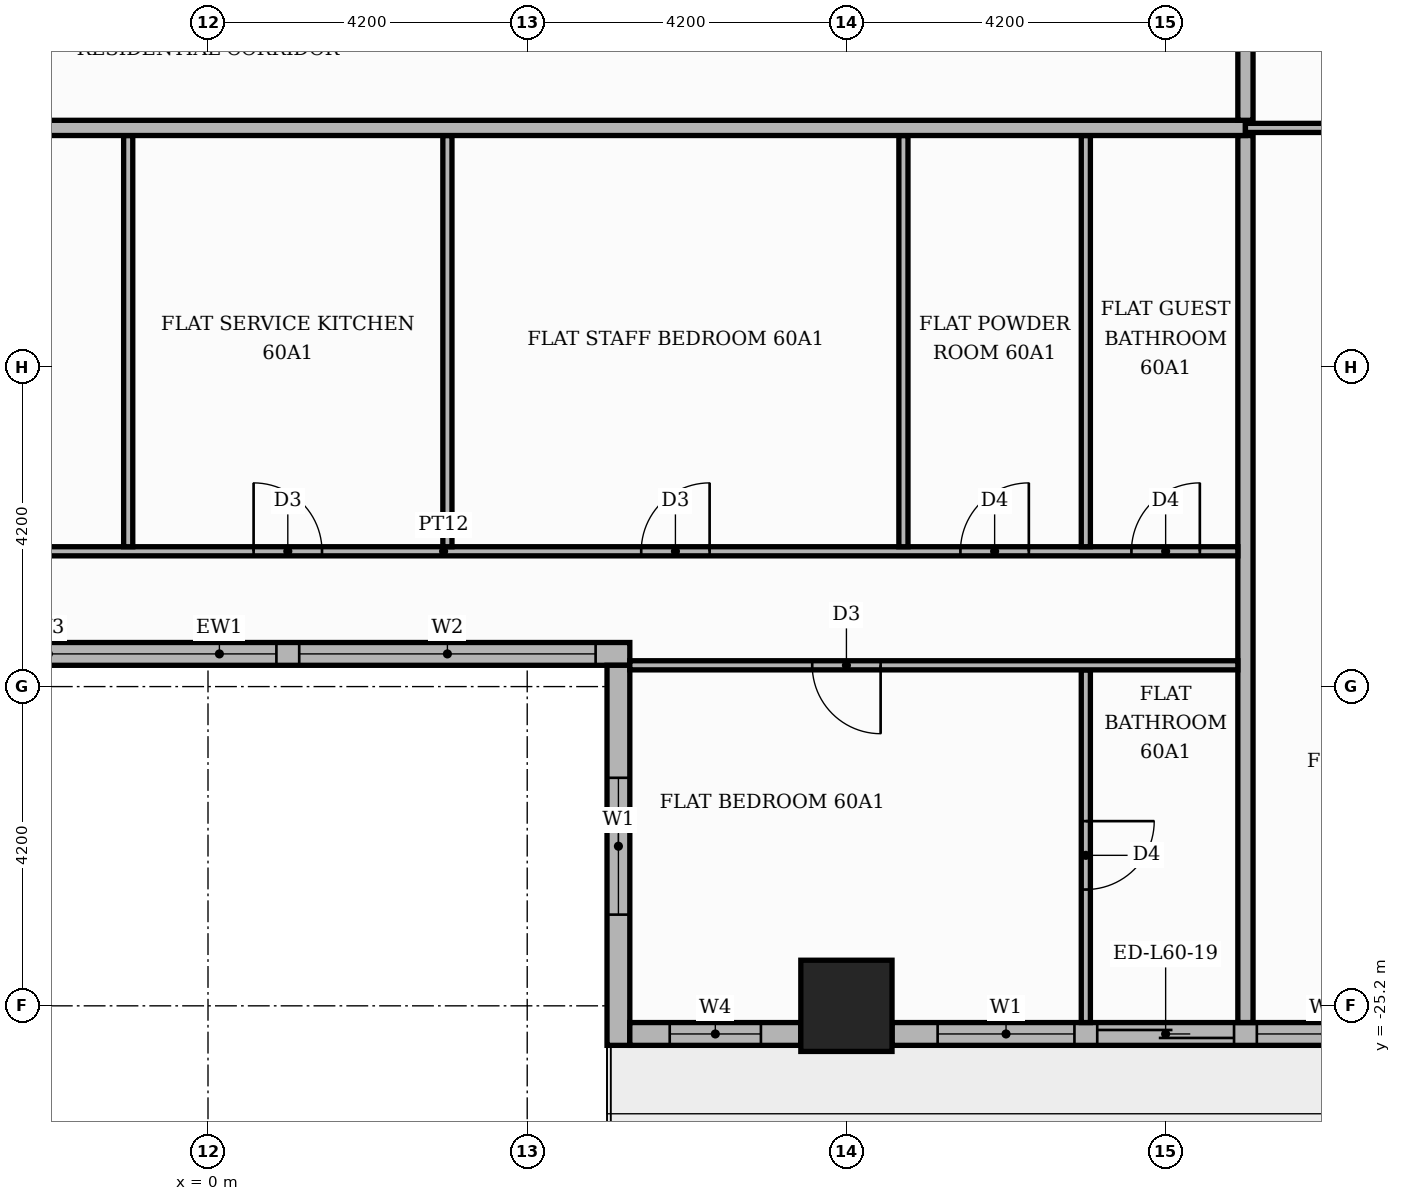
"""IFC4 building model, lengths in metres.
Left out: names, types, materials, properties, quantities, classifications, styles, units other than length and angle.
Written with IfcOpenShell. Run it as: python <this file> out.ifc"""

import sys

from ifc_helpers import new_model, si_unit, direction, frame, frame_2d, origin, origin_2d, place, context, subcontext, project, spatial, rectangle, extrude, element, fill, save


model = new_model("IFC4")
c1 = context("Model", 3, precision=1e-05, world=origin(), true_north=direction((0.0, 1.0)))
c2 = subcontext(c1, "Body", "Model", "MODEL_VIEW")
j1 = project(units=[si_unit("LENGTHUNIT", "METRE"), si_unit("PLANEANGLEUNIT", "RADIAN")], contexts=[c1])
p1 = place(None, origin())
s1 = spatial("IfcSite", under=j1, at=p1, CompositionType="ELEMENT")
p2 = place(p1, origin())
s2 = spatial("IfcBuilding", under=s1, at=p2, CompositionType="ELEMENT")
p3 = place(p2, frame((0.0, 0.0, 252.3)))
s3 = spatial("IfcBuildingStorey", under=s2, at=p3, CompositionType="ELEMENT", Elevation=252.3)
p4 = place(p3, frame((8.4, -25.2, 0.0), z_axis=(0.0, 0.0, 1.0), x_axis=(1.0, 0.0, 0.0)))
e1 = element("IfcColumn", 1, at=p4, inside=s3, PredefinedType="COLUMN", context=c2, shape_type="SweptSolid", body=[
    extrude(rectangle(XDim=1.2, YDim=1.2, at=origin_2d()), origin(), (0.0, 0.0, 1.0), 3.9),
])
p5 = place(p3, frame((-5.25, -20.57, 0.0), z_axis=(0.0, 0.0, 1.0), x_axis=(1.0, 0.0, 0.0)))
e2 = element("IfcWall", 2, at=p5, inside=s3, PredefinedType="STANDARD", context=c2, shape_type="SweptSolid", body=[
    extrude(rectangle(XDim=10.8, YDim=0.3, at=frame_2d((5.4, 0.0))), origin(), (0.0, 0.0, 1.0), 3.48),
])
p6 = place(p5, frame((0.15, 0.0, 0.9)))
e3 = element("IfcOpeningElement", 3, at=p6, cuts=e2, PredefinedType="OPENING", context=c2, shape_type="SweptSolid", body=[
    extrude(rectangle(XDim=6.0, YDim=2.1, at=frame_2d((3.0, 1.05))), frame((0.0, 0.16, 0.0), z_axis=(0.0, -1.0, 0.0), x_axis=(1.0, 0.0, 0.0)), (0.0, 0.0, 1.0), 0.32),
])
p7 = place(p5, frame((6.45, 0.0, 0.9)))
e4 = element("IfcOpeningElement", 4, at=p7, cuts=e2, PredefinedType="OPENING", context=c2, shape_type="SweptSolid", body=[
    extrude(rectangle(XDim=3.9, YDim=2.1, at=frame_2d((1.95, 1.05))), frame((0.0, 0.16, 0.0), z_axis=(0.0, -1.0, 0.0), x_axis=(1.0, 0.0, 0.0)), (0.0, 0.0, 1.0), 0.32),
])
p8 = place(p3, frame((5.4, -20.72, 0.0), z_axis=(0.0, 0.0, 1.0), x_axis=(0.0, -1.0, 0.0)))
e5 = element("IfcWall", 5, at=p8, inside=s3, PredefinedType="STANDARD", context=c2, shape_type="SweptSolid", body=[
    extrude(rectangle(XDim=5.0, YDim=0.3, at=frame_2d((2.5, 0.0))), origin(), (0.0, 0.0, 1.0), 3.48),
])
p9 = place(p8, frame((1.48, 0.0, 0.9)))
e6 = element("IfcOpeningElement", 6, at=p9, cuts=e5, PredefinedType="OPENING", context=c2, shape_type="SweptSolid", body=[
    extrude(rectangle(XDim=1.8, YDim=2.1, at=frame_2d((0.9, 1.05))), frame((0.0, 0.16, 0.0), z_axis=(0.0, -1.0, 0.0), x_axis=(1.0, 0.0, 0.0)), (0.0, 0.0, 1.0), 0.32),
])
p10 = place(p3, frame((5.55, -25.57, 0.0), z_axis=(0.0, 0.0, 1.0), x_axis=(1.0, 0.0, 0.0)))
e7 = element("IfcWall", 7, at=p10, inside=s3, PredefinedType="STANDARD", context=c2, shape_type="SweptSolid", body=[
    extrude(rectangle(XDim=2.25, YDim=0.3, at=frame_2d((1.125, 0.0))), origin(), (0.0, 0.0, 1.0), 3.48),
])
p11 = place(p10, frame((0.525, 0.0, 0.9)))
e8 = element("IfcOpeningElement", 8, at=p11, cuts=e7, PredefinedType="OPENING", context=c2, shape_type="SweptSolid", body=[
    extrude(rectangle(XDim=1.2, YDim=2.1, at=frame_2d((0.6, 1.05))), frame((0.0, 0.16, 0.0), z_axis=(0.0, -1.0, 0.0), x_axis=(1.0, 0.0, 0.0)), (0.0, 0.0, 1.0), 0.32),
])
p12 = place(p3, frame((9.0, -25.57, 0.0), z_axis=(0.0, 0.0, 1.0), x_axis=(1.0, 0.0, 0.0)))
e9 = element("IfcWall", 9, at=p12, inside=s3, PredefinedType="STANDARD", context=c2, shape_type="SweptSolid", body=[
    extrude(rectangle(XDim=7.2, YDim=0.3, at=frame_2d((3.6, 0.0))), origin(), (0.0, 0.0, 1.0), 3.48),
])
p13 = place(p12, frame((0.6, 0.0, 0.9)))
e10 = element("IfcOpeningElement", 10, at=p13, cuts=e9, PredefinedType="OPENING", context=c2, shape_type="SweptSolid", body=[
    extrude(rectangle(XDim=1.8, YDim=2.1, at=frame_2d((0.9, 1.05))), frame((0.0, 0.16, 0.0), z_axis=(0.0, -1.0, 0.0), x_axis=(1.0, 0.0, 0.0)), (0.0, 0.0, 1.0), 0.32),
])
p14 = place(p12, frame((2.7, 0.0, 0.0)))
e11 = element("IfcOpeningElement", 11, at=p14, cuts=e9, PredefinedType="OPENING", context=c2, shape_type="SweptSolid", body=[
    extrude(rectangle(XDim=1.8, YDim=2.4, at=frame_2d((0.9, 1.2))), frame((0.0, 0.16, 0.0), z_axis=(0.0, -1.0, 0.0), x_axis=(1.0, 0.0, 0.0)), (0.0, 0.0, 1.0), 0.32),
])
p15 = place(p12, frame((4.8, 0.0, 0.9)))
e12 = element("IfcOpeningElement", 12, at=p15, cuts=e9, PredefinedType="OPENING", context=c2, shape_type="SweptSolid", body=[
    extrude(rectangle(XDim=1.8, YDim=2.1, at=frame_2d((0.9, 1.05))), frame((0.0, 0.16, 0.0), z_axis=(0.0, -1.0, 0.0), x_axis=(1.0, 0.0, 0.0)), (0.0, 0.0, 1.0), 0.32),
])
p16 = place(p3, frame((11.55, -25.42, 0.0), z_axis=(0.0, 0.0, 1.0), x_axis=(0.0, 1.0, 0.0)))
e13 = element("IfcWall", 13, at=p16, inside=s3, PredefinedType="PARTITIONING", context=c2, shape_type="SweptSolid", body=[
    extrude(rectangle(XDim=4.64, YDim=0.12, at=frame_2d((2.32, 0.0))), origin(), (0.0, 0.0, 1.0), 3.48),
])
p17 = place(p16, frame((1.75, 0.0, 0.0)))
e14 = element("IfcOpeningElement", 14, at=p17, cuts=e13, PredefinedType="OPENING", context=c2, shape_type="SweptSolid", body=[
    extrude(rectangle(XDim=0.9, YDim=2.1, at=frame_2d((0.45, 1.05))), frame((0.0, 0.07, 0.0), z_axis=(0.0, -1.0, 0.0), x_axis=(1.0, 0.0, 0.0)), (0.0, 0.0, 1.0), 0.14),
])
p18 = place(p3, frame((13.65, -25.42, 0.0), z_axis=(0.0, 0.0, 1.0), x_axis=(0.0, 1.0, 0.0)))
e15 = element("IfcWall", 15, at=p18, inside=s3, PredefinedType="PARTITIONING", context=c2, shape_type="SweptSolid", body=[
    extrude(rectangle(XDim=11.67, YDim=0.2, at=frame_2d((5.835, 0.0))), origin(), (0.0, 0.0, 1.0), 3.48),
])
p19 = place(p3, frame((5.55, -20.72, 0.0), z_axis=(0.0, 0.0, 1.0), x_axis=(1.0, 0.0, 0.0)))
e16 = element("IfcWall", 16, at=p19, inside=s3, PredefinedType="PARTITIONING", context=c2, shape_type="SweptSolid", body=[
    extrude(rectangle(XDim=8.0, YDim=0.12, at=frame_2d((4.0, 0.0))), origin(), (0.0, 0.0, 1.0), 3.48),
])
p20 = place(p19, frame((2.4, 0.0, 0.0)))
e17 = element("IfcOpeningElement", 17, at=p20, cuts=e16, PredefinedType="OPENING", context=c2, shape_type="SweptSolid", body=[
    extrude(rectangle(XDim=0.9, YDim=2.1, at=frame_2d((0.45, 1.05))), frame((0.0, 0.07, 0.0), z_axis=(0.0, -1.0, 0.0), x_axis=(1.0, 0.0, 0.0)), (0.0, 0.0, 1.0), 0.14),
])
p21 = place(p3, frame((-7.35, -19.22, 0.0), z_axis=(0.0, 0.0, 1.0), x_axis=(1.0, 0.0, 0.0)))
e18 = element("IfcWall", 18, at=p21, inside=s3, PredefinedType="PARTITIONING", context=c2, shape_type="SweptSolid", body=[
    extrude(rectangle(XDim=20.9, YDim=0.12, at=frame_2d((10.45, 0.0))), origin(), (0.0, 0.0, 1.0), 3.48),
])
p22 = place(p21, frame((2.7, 0.0, 0.0)))
e19 = element("IfcOpeningElement", 19, at=p22, cuts=e18, PredefinedType="OPENING", context=c2, shape_type="SweptSolid", body=[
    extrude(rectangle(XDim=0.9, YDim=2.1, at=frame_2d((0.45, 1.05))), frame((0.0, 0.07, 0.0), z_axis=(0.0, -1.0, 0.0), x_axis=(1.0, 0.0, 0.0)), (0.0, 0.0, 1.0), 0.14),
])
p23 = place(p21, frame((7.95, 0.0, 0.0)))
e20 = element("IfcOpeningElement", 20, at=p23, cuts=e18, PredefinedType="OPENING", context=c2, shape_type="SweptSolid", body=[
    extrude(rectangle(XDim=0.9, YDim=2.1, at=frame_2d((0.45, 1.05))), frame((0.0, 0.07, 0.0), z_axis=(0.0, -1.0, 0.0), x_axis=(1.0, 0.0, 0.0)), (0.0, 0.0, 1.0), 0.14),
])
p24 = place(p21, frame((13.05, 0.0, 0.0)))
e21 = element("IfcOpeningElement", 21, at=p24, cuts=e18, PredefinedType="OPENING", context=c2, shape_type="SweptSolid", body=[
    extrude(rectangle(XDim=0.9, YDim=2.1, at=frame_2d((0.45, 1.05))), frame((0.0, 0.07, 0.0), z_axis=(0.0, -1.0, 0.0), x_axis=(1.0, 0.0, 0.0)), (0.0, 0.0, 1.0), 0.14),
])
p25 = place(p21, frame((17.25, 0.0, 0.0)))
e22 = element("IfcOpeningElement", 22, at=p25, cuts=e18, PredefinedType="OPENING", context=c2, shape_type="SweptSolid", body=[
    extrude(rectangle(XDim=0.9, YDim=2.1, at=frame_2d((0.45, 1.05))), frame((0.0, 0.07, 0.0), z_axis=(0.0, -1.0, 0.0), x_axis=(1.0, 0.0, 0.0)), (0.0, 0.0, 1.0), 0.14),
])
p26 = place(p21, frame((19.5, 0.0, 0.0)))
e23 = element("IfcOpeningElement", 23, at=p26, cuts=e18, PredefinedType="OPENING", context=c2, shape_type="SweptSolid", body=[
    extrude(rectangle(XDim=0.9, YDim=2.1, at=frame_2d((0.45, 1.05))), frame((0.0, 0.07, 0.0), z_axis=(0.0, -1.0, 0.0), x_axis=(1.0, 0.0, 0.0)), (0.0, 0.0, 1.0), 0.14),
])
for number, where, z_axis, x_axis in (
    (24, (-1.05, -19.16, 0.0), (0.0, 0.0, 1.0), (0.0, 1.0, 0.0)),
    (25, (3.15, -19.16, 0.0), (0.0, 0.0, 1.0), (0.0, 1.0, 0.0)),
    (26, (9.15, -19.16, 0.0), (0.0, 0.0, 1.0), (0.0, 1.0, 0.0)),
    (27, (11.55, -19.16, 0.0), (0.0, 0.0, 1.0), (0.0, 1.0, 0.0)),
):
    element("IfcWall", number, at=place(p3, frame(where, z_axis=z_axis, x_axis=x_axis)), inside=s3, PredefinedType="PARTITIONING", context=c2, shape_type="SweptSolid", body=[
        extrude(rectangle(XDim=5.41, YDim=0.12, at=frame_2d((2.705, 0.0))), origin(), (0.0, 0.0, 1.0), 3.48),
    ])
p27 = place(p3, frame((-25.42, -13.65, 0.0), z_axis=(0.0, 0.0, 1.0), x_axis=(1.0, 0.0, 0.0)))
e28 = element("IfcWall", 28, at=p27, inside=s3, PredefinedType="PARTITIONING", context=c2, shape_type="SweptSolid", body=[
    extrude(rectangle(XDim=39.07, YDim=0.2, at=frame_2d((19.535, 0.0))), origin(), (0.0, 0.0, 1.0), 3.48),
])
p28 = place(p27, frame((14.37, 0.0, 0.0)))
e29 = element("IfcOpeningElement", 29, at=p28, cuts=e28, PredefinedType="OPENING", context=c2, shape_type="SweptSolid", body=[
    extrude(rectangle(XDim=1.1, YDim=2.4, at=frame_2d((0.55, 1.2))), frame((0.0, 0.11, 0.0), z_axis=(0.0, -1.0, 0.0), x_axis=(1.0, 0.0, 0.0)), (0.0, 0.0, 1.0), 0.22),
])
p29 = place(p3, frame((13.65, -13.65, 0.0), z_axis=(0.0, 0.0, 1.0), x_axis=(1.0, 0.0, 0.0)))
e30 = element("IfcWall", 30, at=p29, inside=s3, PredefinedType="PARTITIONING", context=c2, shape_type="SweptSolid", body=[
    extrude(rectangle(XDim=6.17, YDim=0.12, at=frame_2d((3.085, 0.0))), origin(), (0.0, 0.0, 1.0), 3.48),
])
p30 = place(p29, frame((2.635, 0.0, 0.0)))
e31 = element("IfcOpeningElement", 31, at=p30, cuts=e30, PredefinedType="OPENING", context=c2, shape_type="SweptSolid", body=[
    extrude(rectangle(XDim=0.9, YDim=2.1, at=frame_2d((0.45, 1.05))), frame((0.0, 0.07, 0.0), z_axis=(0.0, -1.0, 0.0), x_axis=(1.0, 0.0, 0.0)), (0.0, 0.0, 1.0), 0.14),
])
p31 = place(p3, frame((13.65, -13.55, 0.0), z_axis=(0.0, 0.0, 1.0), x_axis=(0.0, 1.0, 0.0)))
e32 = element("IfcWall", 32, at=p31, inside=s3, PredefinedType="PARTITIONING", context=c2, shape_type="SweptSolid", body=[
    extrude(rectangle(XDim=2.45, YDim=0.2, at=frame_2d((1.225, 0.0))), origin(), (0.0, 0.0, 1.0), 3.48),
])
p32 = place(p6, origin())
e33 = element("IfcWindow", 33, at=p32, inside=s3, PartitioningType="SINGLE_PANEL", PredefinedType="WINDOW", context=c2, shape_type="SweptSolid", body=[
    extrude(rectangle(XDim=6.0, YDim=2.1, at=frame_2d((3.0, 1.05))), frame((0.0, 0.03, 0.0), z_axis=(0.0, -1.0, 0.0), x_axis=(1.0, 0.0, 0.0)), (0.0, 0.0, 1.0), 0.06),
])
fill(e3, e33)
p33 = place(p7, origin())
e34 = element("IfcWindow", 34, at=p33, inside=s3, PartitioningType="SINGLE_PANEL", PredefinedType="WINDOW", context=c2, shape_type="SweptSolid", body=[
    extrude(rectangle(XDim=3.9, YDim=2.1, at=frame_2d((1.95, 1.05))), frame((0.0, 0.03, 0.0), z_axis=(0.0, -1.0, 0.0), x_axis=(1.0, 0.0, 0.0)), (0.0, 0.0, 1.0), 0.06),
])
fill(e4, e34)
p34 = place(p9, origin())
e35 = element("IfcWindow", 35, at=p34, inside=s3, PartitioningType="SINGLE_PANEL", PredefinedType="WINDOW", context=c2, shape_type="SweptSolid", body=[
    extrude(rectangle(XDim=1.8, YDim=2.1, at=frame_2d((0.9, 1.05))), frame((0.0, 0.03, 0.0), z_axis=(0.0, -1.0, 0.0), x_axis=(1.0, 0.0, 0.0)), (0.0, 0.0, 1.0), 0.06),
])
fill(e6, e35)
p35 = place(p11, origin())
e36 = element("IfcWindow", 36, at=p35, inside=s3, PartitioningType="SINGLE_PANEL", PredefinedType="WINDOW", context=c2, shape_type="SweptSolid", body=[
    extrude(rectangle(XDim=1.2, YDim=2.1, at=frame_2d((0.6, 1.05))), frame((0.0, 0.03, 0.0), z_axis=(0.0, -1.0, 0.0), x_axis=(1.0, 0.0, 0.0)), (0.0, 0.0, 1.0), 0.06),
])
fill(e8, e36)
p36 = place(p13, origin())
e37 = element("IfcWindow", 37, at=p36, inside=s3, PartitioningType="SINGLE_PANEL", PredefinedType="WINDOW", context=c2, shape_type="SweptSolid", body=[
    extrude(rectangle(XDim=1.8, YDim=2.1, at=frame_2d((0.9, 1.05))), frame((0.0, 0.03, 0.0), z_axis=(0.0, -1.0, 0.0), x_axis=(1.0, 0.0, 0.0)), (0.0, 0.0, 1.0), 0.06),
])
fill(e10, e37)
p37 = place(p14, origin())
e38 = element("IfcDoor", 38, at=p37, inside=s3, OperationType="SLIDING_TO_RIGHT", PredefinedType="DOOR", context=c2, shape_type="SweptSolid", body=[
    extrude(rectangle(XDim=1.8, YDim=2.4, at=frame_2d((0.9, 1.2))), frame((0.0, 0.025, 0.0), z_axis=(0.0, -1.0, 0.0), x_axis=(1.0, 0.0, 0.0)), (0.0, 0.0, 1.0), 0.05),
])
fill(e11, e38)
p38 = place(p15, origin())
e39 = element("IfcWindow", 39, at=p38, inside=s3, PartitioningType="SINGLE_PANEL", PredefinedType="WINDOW", context=c2, shape_type="SweptSolid", body=[
    extrude(rectangle(XDim=1.8, YDim=2.1, at=frame_2d((0.9, 1.05))), frame((0.0, 0.03, 0.0), z_axis=(0.0, -1.0, 0.0), x_axis=(1.0, 0.0, 0.0)), (0.0, 0.0, 1.0), 0.06),
])
fill(e12, e39)
p39 = place(p23, origin())
e40 = element("IfcDoor", 40, at=p39, inside=s3, OperationType="SINGLE_SWING_LEFT", PredefinedType="DOOR", context=c2, shape_type="SweptSolid", body=[
    extrude(rectangle(XDim=0.9, YDim=2.1, at=frame_2d((0.45, 1.05))), frame((0.0, 0.025, 0.0), z_axis=(0.0, -1.0, 0.0), x_axis=(1.0, 0.0, 0.0)), (0.0, 0.0, 1.0), 0.05),
])
fill(e20, e40)
p40 = place(p24, origin())
e41 = element("IfcDoor", 41, at=p40, inside=s3, OperationType="SINGLE_SWING_RIGHT", PredefinedType="DOOR", context=c2, shape_type="SweptSolid", body=[
    extrude(rectangle(XDim=0.9, YDim=2.1, at=frame_2d((0.45, 1.05))), frame((0.0, 0.025, 0.0), z_axis=(0.0, -1.0, 0.0), x_axis=(1.0, 0.0, 0.0)), (0.0, 0.0, 1.0), 0.05),
])
fill(e21, e41)
p41 = place(p25, origin())
e42 = element("IfcDoor", 42, at=p41, inside=s3, OperationType="SINGLE_SWING_RIGHT", PredefinedType="DOOR", context=c2, shape_type="SweptSolid", body=[
    extrude(rectangle(XDim=0.9, YDim=2.1, at=frame_2d((0.45, 1.05))), frame((0.0, 0.025, 0.0), z_axis=(0.0, -1.0, 0.0), x_axis=(1.0, 0.0, 0.0)), (0.0, 0.0, 1.0), 0.05),
])
fill(e22, e42)
p42 = place(p26, origin())
e43 = element("IfcDoor", 43, at=p42, inside=s3, OperationType="SINGLE_SWING_RIGHT", PredefinedType="DOOR", context=c2, shape_type="SweptSolid", body=[
    extrude(rectangle(XDim=0.9, YDim=2.1, at=frame_2d((0.45, 1.05))), frame((0.0, 0.025, 0.0), z_axis=(0.0, -1.0, 0.0), x_axis=(1.0, 0.0, 0.0)), (0.0, 0.0, 1.0), 0.05),
])
fill(e23, e43)
p43 = place(p20, frame((0.9, 0.0, 0.0), z_axis=(0.0, 0.0, 1.0), x_axis=(-1.0, 0.0, 0.0)))
e44 = element("IfcDoor", 44, at=p43, inside=s3, OperationType="SINGLE_SWING_RIGHT", PredefinedType="DOOR", context=c2, shape_type="SweptSolid", body=[
    extrude(rectangle(XDim=0.9, YDim=2.1, at=frame_2d((0.45, 1.05))), frame((0.0, 0.025, 0.0), z_axis=(0.0, -1.0, 0.0), x_axis=(1.0, 0.0, 0.0)), (0.0, 0.0, 1.0), 0.05),
])
fill(e17, e44)
p44 = place(p17, frame((0.9, 0.0, 0.0), z_axis=(0.0, 0.0, 1.0), x_axis=(-1.0, 0.0, 0.0)))
e45 = element("IfcDoor", 45, at=p44, inside=s3, OperationType="SINGLE_SWING_RIGHT", PredefinedType="DOOR", context=c2, shape_type="SweptSolid", body=[
    extrude(rectangle(XDim=0.9, YDim=2.1, at=frame_2d((0.45, 1.05))), frame((0.0, 0.025, 0.0), z_axis=(0.0, -1.0, 0.0), x_axis=(1.0, 0.0, 0.0)), (0.0, 0.0, 1.0), 0.05),
])
fill(e14, e45)
save(model, sys.argv[1])
